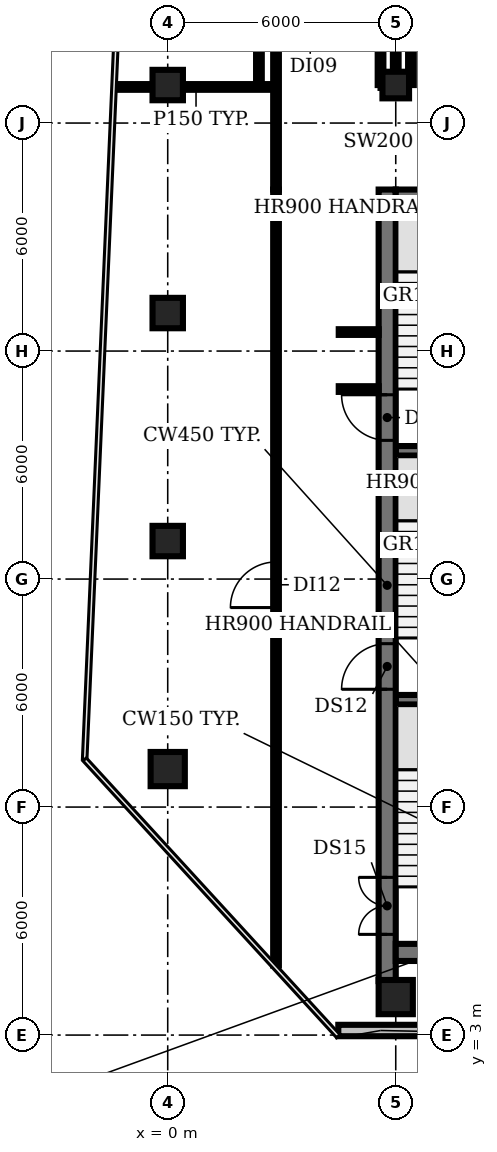
"""IFC4 building model, lengths in metres.
Left out: names, types, materials, properties, quantities, classifications, styles, units other than length and angle.
Written with IfcOpenShell. Run it as: python <this file> out.ifc"""

import sys

from ifc_helpers import new_model, si_unit, direction, frame, frame_2d, origin, origin_2d, place, context, subcontext, project, spatial, rectangle, circle, extrude, element, fill, save


model = new_model("IFC4")
c1 = context("Model", 3, precision=1e-05, world=origin(), true_north=direction((0.0, 1.0)))
c2 = subcontext(c1, "Body", "Model", "MODEL_VIEW")
j1 = project(units=[si_unit("LENGTHUNIT", "METRE"), si_unit("PLANEANGLEUNIT", "RADIAN")], contexts=[c1])
p1 = place(None, origin())
s1 = spatial("IfcSite", under=j1, at=p1, CompositionType="ELEMENT")
p2 = place(p1, origin())
s2 = spatial("IfcBuilding", under=s1, at=p2, CompositionType="ELEMENT")
p3 = place(p2, frame((0.0, 0.0, 239.0)))
s3 = spatial("IfcBuildingStorey", under=s2, at=p3, CompositionType="ELEMENT", Elevation=239.0)
p4 = place(p3, frame((0.0, 10.0, 0.0), z_axis=(0.0, 0.0, 1.0), x_axis=(1.0, 0.0, 0.0)))
e1 = element("IfcColumn", 1, at=p4, inside=s3, PredefinedType="COLUMN", context=c2, shape_type="SweptSolid", body=[
    extrude(circle(Radius=0.45, at=origin_2d()), origin(), (0.0, 0.0, 1.0), 3.85),
])
for number, where, z_axis, x_axis in (
    (2, (0.0, 16.0, 0.0), (0.0, 0.0, 1.0), (1.0, 0.0, 0.0)),
    (3, (0.0, 22.0, 0.0), (0.0, 0.0, 1.0), (1.0, 0.0, 0.0)),
    (4, (0.0, 28.0, 0.0), (0.0, 0.0, 1.0), (1.0, 0.0, 0.0)),
):
    element("IfcColumn", number, at=place(p3, frame(where, z_axis=z_axis, x_axis=x_axis)), inside=s3, PredefinedType="COLUMN", context=c2, shape_type="SweptSolid", body=[
        extrude(rectangle(XDim=0.8, YDim=0.8, at=origin_2d()), origin(), (0.0, 0.0, 1.0), 3.85),
    ])
p5 = place(p3, frame((6.0, 4.0, 0.0), z_axis=(0.0, 0.0, 1.0), x_axis=(1.0, 0.0, 0.0)))
e5 = element("IfcColumn", 5, at=p5, inside=s3, PredefinedType="COLUMN", context=c2, shape_type="SweptSolid", body=[
    extrude(circle(Radius=0.45, at=origin_2d()), origin(), (0.0, 0.0, 1.0), 3.85),
])
p6 = place(p3, frame((6.0, 28.0, 0.0), z_axis=(0.0, 0.0, 1.0), x_axis=(1.0, 0.0, 0.0)))
e6 = element("IfcColumn", 6, at=p6, inside=s3, PredefinedType="COLUMN", context=c2, shape_type="SweptSolid", body=[
    extrude(rectangle(XDim=0.7, YDim=0.7, at=origin_2d()), origin(), (0.0, 0.0, 1.0), 3.85),
])
p7 = place(p3, frame((4.489, 3.12, 0.0), z_axis=(0.0, 0.0, 1.0), x_axis=(1.0, 0.0, 0.0)))
e7 = element("IfcWall", 7, at=p7, inside=s3, PredefinedType="SOLIDWALL", context=c2, shape_type="SweptSolid", body=[
    extrude(rectangle(XDim=9.069, YDim=0.3, at=frame_2d((4.535, 0.0))), origin(), (0.0, 0.0, 1.0), 3.85),
])
for number, where, z_axis, x_axis in (
    (8, (6.0, 11.825, 0.0), (0.0, 0.0, 1.0), (1.0, 0.0, 0.0)),
    (9, (6.0, 18.375, 0.0), (0.0, 0.0, 1.0), (1.0, 0.0, 0.0)),
):
    element("IfcWall", number, at=place(p3, frame(where, z_axis=z_axis, x_axis=x_axis)), inside=s3, PredefinedType="SHEAR", context=c2, shape_type="SweptSolid", body=[
        extrude(rectangle(XDim=3.15, YDim=0.25, at=frame_2d((1.575, 0.0))), origin(), (0.0, 0.0, 1.0), 3.85),
    ])
p8 = place(p3, frame((5.775, 4.42, 0.0), z_axis=(0.0, 0.0, 1.0), x_axis=(0.0, 1.0, 0.0)))
e10 = element("IfcWall", 10, at=p8, inside=s3, PredefinedType="SHEAR", context=c2, shape_type="SweptSolid", body=[
    extrude(rectangle(XDim=20.83, YDim=0.45, at=frame_2d((10.415, 0.0))), origin(), (0.0, 0.0, 1.0), 3.85),
])
p9 = place(p8, frame((1.23, 0.0, 0.0)))
e11 = element("IfcOpeningElement", 11, at=p9, cuts=e10, PredefinedType="OPENING", context=c2, shape_type="SweptSolid", body=[
    extrude(rectangle(XDim=1.5, YDim=2.1, at=frame_2d((0.75, 1.05))), frame((0.0, 0.235, 0.0), z_axis=(0.0, -1.0, 0.0), x_axis=(1.0, 0.0, 0.0)), (0.0, 0.0, 1.0), 0.47),
])
p10 = place(p8, frame((7.68, 0.0, 0.0)))
e12 = element("IfcOpeningElement", 12, at=p10, cuts=e10, PredefinedType="OPENING", context=c2, shape_type="SweptSolid", body=[
    extrude(rectangle(XDim=1.2, YDim=2.1, at=frame_2d((0.6, 1.05))), frame((0.0, 0.235, 0.0), z_axis=(0.0, -1.0, 0.0), x_axis=(1.0, 0.0, 0.0)), (0.0, 0.0, 1.0), 0.47),
])
p11 = place(p8, frame((14.23, 0.0, 0.0)))
e13 = element("IfcOpeningElement", 13, at=p11, cuts=e10, PredefinedType="OPENING", context=c2, shape_type="SweptSolid", body=[
    extrude(rectangle(XDim=1.2, YDim=2.1, at=frame_2d((0.6, 1.05))), frame((0.0, 0.235, 0.0), z_axis=(0.0, -1.0, 0.0), x_axis=(1.0, 0.0, 0.0)), (0.0, 0.0, 1.0), 0.47),
])
p12 = place(p3, frame((24.0, 5.175, 0.0), z_axis=(0.0, 0.0, 1.0), x_axis=(-1.0, 0.0, 0.0)))
e14 = element("IfcWall", 14, at=p12, inside=s3, PredefinedType="SHEAR", context=c2, shape_type="SweptSolid", body=[
    extrude(rectangle(XDim=18.0, YDim=0.45, at=frame_2d((9.0, 0.0))), origin(), (0.0, 0.0, 1.0), 3.85),
])
p13 = place(p12, frame((0.825, 0.0, 0.0)))
e15 = element("IfcOpeningElement", 15, at=p13, cuts=e14, PredefinedType="OPENING", context=c2, shape_type="SweptSolid", body=[
    extrude(rectangle(XDim=1.5, YDim=2.1, at=frame_2d((0.75, 1.05))), frame((0.0, 0.235, 0.0), z_axis=(0.0, -1.0, 0.0), x_axis=(1.0, 0.0, 0.0)), (0.0, 0.0, 1.0), 0.47),
])
p14 = place(p12, frame((15.675, 0.0, 0.0)))
e16 = element("IfcOpeningElement", 16, at=p14, cuts=e14, PredefinedType="OPENING", context=c2, shape_type="SweptSolid", body=[
    extrude(rectangle(XDim=1.5, YDim=2.1, at=frame_2d((0.75, 1.05))), frame((0.0, 0.235, 0.0), z_axis=(0.0, -1.0, 0.0), x_axis=(1.0, 0.0, 0.0)), (0.0, 0.0, 1.0), 0.47),
])
p15 = place(p12, frame((13.0, 0.0, 0.0)))
e17 = element("IfcOpeningElement", 17, at=p15, cuts=e14, PredefinedType="OPENING", context=c2, shape_type="SweptSolid", body=[
    extrude(rectangle(XDim=1.2, YDim=2.1, at=frame_2d((0.6, 1.05))), frame((0.0, 0.235, 0.0), z_axis=(0.0, -1.0, 0.0), x_axis=(1.0, 0.0, 0.0)), (0.0, 0.0, 1.0), 0.47),
])
p16 = place(p12, frame((4.4, 0.0, 0.0)))
e18 = element("IfcOpeningElement", 18, at=p16, cuts=e14, PredefinedType="OPENING", context=c2, shape_type="SweptSolid", body=[
    extrude(rectangle(XDim=1.0, YDim=2.1, at=frame_2d((0.5, 1.05))), frame((0.0, 0.235, 0.0), z_axis=(0.0, -1.0, 0.0), x_axis=(1.0, 0.0, 0.0)), (0.0, 0.0, 1.0), 0.47),
])
p17 = place(p3, frame((6.0, 25.025, 0.0), z_axis=(0.0, 0.0, 1.0), x_axis=(1.0, 0.0, 0.0)))
e19 = element("IfcWall", 19, at=p17, inside=s3, PredefinedType="SHEAR", context=c2, shape_type="SweptSolid", body=[
    extrude(rectangle(XDim=18.0, YDim=0.45, at=frame_2d((9.0, 0.0))), origin(), (0.0, 0.0, 1.0), 3.85),
])
p18 = place(p3, frame((-1.36, 27.95, 0.0), z_axis=(0.0, 0.0, 1.0), x_axis=(1.0, 0.0, 0.0)))
e20 = element("IfcWall", 20, at=p18, inside=s3, PredefinedType="PARTITIONING", context=c2, shape_type="SweptSolid", body=[
    extrude(rectangle(XDim=4.21, YDim=0.15, at=frame_2d((2.105, 0.0))), origin(), (0.0, 0.0, 1.0), 2.88),
])
p19 = place(p3, frame((2.4, 27.95, 0.0), z_axis=(0.0, 0.0, 1.0), x_axis=(0.0, 1.0, 0.0)))
e21 = element("IfcWall", 21, at=p19, inside=s3, PredefinedType="PARTITIONING", context=c2, shape_type="SweptSolid", body=[
    extrude(rectangle(XDim=6.0, YDim=0.15, at=frame_2d((3.0, 0.0))), origin(), (0.0, 0.0, 1.0), 2.88),
])
p20 = place(p3, frame((2.85, 4.83, 0.0), z_axis=(0.0, 0.0, 1.0), x_axis=(0.0, 1.0, 0.0)))
e22 = element("IfcWall", 22, at=p20, inside=s3, PredefinedType="PARTITIONING", context=c2, shape_type="SweptSolid", body=[
    extrude(rectangle(XDim=20.42, YDim=0.15, at=frame_2d((10.21, 0.0))), origin(), (0.0, 0.0, 1.0), 2.88),
])
p21 = place(p20, frame((9.42, 0.0, 0.0)))
e23 = element("IfcOpeningElement", 23, at=p21, cuts=e22, PredefinedType="OPENING", context=c2, shape_type="SweptSolid", body=[
    extrude(rectangle(XDim=1.2, YDim=2.1, at=frame_2d((0.6, 1.05))), frame((0.0, 0.085, 0.0), z_axis=(0.0, -1.0, 0.0), x_axis=(1.0, 0.0, 0.0)), (0.0, 0.0, 1.0), 0.17),
])
p22 = place(p3, frame((2.85, 25.25, 0.0), z_axis=(0.0, 0.0, 1.0), x_axis=(0.0, 1.0, 0.0)))
e24 = element("IfcWall", 24, at=p22, inside=s3, PredefinedType="PARTITIONING", context=c2, shape_type="SweptSolid", body=[
    extrude(rectangle(XDim=3.9, YDim=0.15, at=frame_2d((1.95, 0.0))), origin(), (0.0, 0.0, 1.0), 2.88),
])
for number, where, z_axis, x_axis in (
    (25, (4.5, 20.0, 0.0), (0.0, 0.0, 1.0), (1.0, 0.0, 0.0)),
    (26, (4.5, 21.5, 0.0), (0.0, 0.0, 1.0), (1.0, 0.0, 0.0)),
):
    element("IfcWall", number, at=place(p3, frame(where, z_axis=z_axis, x_axis=x_axis)), inside=s3, PredefinedType="PARTITIONING", context=c2, shape_type="SweptSolid", body=[
        extrude(rectangle(XDim=1.05, YDim=0.15, at=frame_2d((0.525, 0.0))), origin(), (0.0, 0.0, 1.0), 2.88),
    ])
p23 = place(p3, frame((5.6, 28.0, 0.0), z_axis=(0.0, 0.0, 1.0), x_axis=(0.0, 1.0, 0.0)))
e27 = element("IfcWall", 27, at=p23, inside=s3, PredefinedType="PARTITIONING", context=c2, shape_type="SweptSolid", body=[
    extrude(rectangle(XDim=1.15, YDim=0.15, at=frame_2d((0.575, 0.0))), origin(), (0.0, 0.0, 1.0), 2.88),
])
p24 = place(p3, frame((5.6, 28.0, 0.0), z_axis=(0.0, 0.0, 1.0), x_axis=(1.0, 0.0, 0.0)))
e28 = element("IfcWall", 28, at=p24, inside=s3, PredefinedType="PARTITIONING", context=c2, shape_type="SweptSolid", body=[
    extrude(rectangle(XDim=0.4, YDim=0.15, at=frame_2d((0.2, 0.0))), origin(), (0.0, 0.0, 1.0), 2.88),
])
p25 = place(p3, frame((6.0, 28.0, 0.0), z_axis=(0.0, 0.0, 1.0), x_axis=(0.0, 1.0, 0.0)))
e29 = element("IfcWall", 29, at=p25, inside=s3, PredefinedType="PARTITIONING", context=c2, shape_type="SweptSolid", body=[
    extrude(rectangle(XDim=5.95, YDim=0.15, at=frame_2d((2.975, 0.0))), origin(), (0.0, 0.0, 1.0), 2.88),
])
p26 = place(p3, frame((6.4, 28.0, 0.0), z_axis=(0.0, 0.0, 1.0), x_axis=(0.0, 1.0, 0.0)))
e30 = element("IfcWall", 30, at=p26, inside=s3, PredefinedType="PARTITIONING", context=c2, shape_type="SweptSolid", body=[
    extrude(rectangle(XDim=1.15, YDim=0.15, at=frame_2d((0.575, 0.0))), origin(), (0.0, 0.0, 1.0), 2.88),
])
p27 = place(p9, origin())
e31 = element("IfcDoor", 31, at=p27, inside=s3, OperationType="DOUBLE_DOOR_SINGLE_SWING", PredefinedType="DOOR", context=c2, shape_type="SweptSolid", body=[
    extrude(rectangle(XDim=1.5, YDim=2.1, at=frame_2d((0.75, 1.05))), frame((0.0, 0.025, 0.0), z_axis=(0.0, -1.0, 0.0), x_axis=(1.0, 0.0, 0.0)), (0.0, 0.0, 1.0), 0.05),
])
fill(e11, e31)
p28 = place(p10, origin())
e32 = element("IfcDoor", 32, at=p28, inside=s3, OperationType="SINGLE_SWING_LEFT", PredefinedType="DOOR", context=c2, shape_type="SweptSolid", body=[
    extrude(rectangle(XDim=1.2, YDim=2.1, at=frame_2d((0.6, 1.05))), frame((0.0, 0.025, 0.0), z_axis=(0.0, -1.0, 0.0), x_axis=(1.0, 0.0, 0.0)), (0.0, 0.0, 1.0), 0.05),
])
fill(e12, e32)
p29 = place(p11, origin())
e33 = element("IfcDoor", 33, at=p29, inside=s3, OperationType="SINGLE_SWING_RIGHT", PredefinedType="DOOR", context=c2, shape_type="SweptSolid", body=[
    extrude(rectangle(XDim=1.2, YDim=2.1, at=frame_2d((0.6, 1.05))), frame((0.0, 0.025, 0.0), z_axis=(0.0, -1.0, 0.0), x_axis=(1.0, 0.0, 0.0)), (0.0, 0.0, 1.0), 0.05),
])
fill(e13, e33)
p30 = place(p21, origin())
e34 = element("IfcDoor", 34, at=p30, inside=s3, OperationType="SINGLE_SWING_LEFT", PredefinedType="DOOR", context=c2, shape_type="SweptSolid", body=[
    extrude(rectangle(XDim=1.2, YDim=2.1, at=frame_2d((0.6, 1.05))), frame((0.0, 0.025, 0.0), z_axis=(0.0, -1.0, 0.0), x_axis=(1.0, 0.0, 0.0)), (0.0, 0.0, 1.0), 0.05),
])
fill(e23, e34)
save(model, sys.argv[1])
